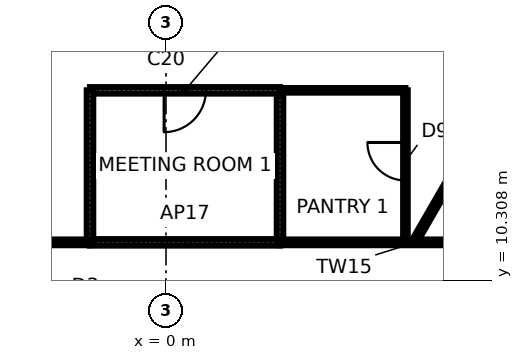
"""IFC4 building model, lengths in metres.
Left out: names, types, materials, properties, quantities, classifications, styles, units other than length and angle.
Written with IfcOpenShell. Run it as: python <this file> out.ifc"""

import sys

from ifc_helpers import new_model, si_unit, direction, frame, frame_2d, origin, place, context, subcontext, project, spatial, rectangle, extrude, element, fill, save


model = new_model("IFC4")
c1 = context("Model", 3, precision=1e-05, world=origin(), true_north=direction((0.0, 1.0)))
c2 = subcontext(c1, "Body", "Model", "MODEL_VIEW")
j1 = project(units=[si_unit("LENGTHUNIT", "METRE"), si_unit("PLANEANGLEUNIT", "RADIAN")], contexts=[c1])
p1 = place(None, origin())
s1 = spatial("IfcSite", under=j1, at=p1, CompositionType="ELEMENT")
p2 = place(p1, origin())
s2 = spatial("IfcBuilding", under=s1, at=p2, CompositionType="ELEMENT")
p3 = place(p2, frame((0.0, 0.0, 44.8)))
s3 = spatial("IfcBuildingStorey", under=s2, at=p3, CompositionType="ELEMENT", Elevation=44.8)
p4 = place(p3, frame((16.0, 11.3, 0.0), z_axis=(0.0, 0.0, 1.0), x_axis=(-1.0, 0.0, 0.0)))
e1 = element("IfcWall", 1, at=p4, inside=s3, PredefinedType="PARTITIONING", context=c2, shape_type="SweptSolid", body=[
    extrude(rectangle(XDim=13.0, YDim=0.15, at=frame_2d((6.5, 0.0))), origin(), (0.0, 0.0, 1.0), 4.04),
])
p5 = place(p4, frame((3.713, 0.0, 0.0)))
e2 = element("IfcOpeningElement", 2, at=p5, cuts=e1, PredefinedType="OPENING", context=c2, shape_type="SweptSolid", body=[
    extrude(rectangle(XDim=2.0, YDim=2.4, at=frame_2d((1.0, 1.2))), frame((0.0, 0.085, 0.0), z_axis=(0.0, -1.0, 0.0), x_axis=(1.0, 0.0, 0.0)), (0.0, 0.0, 1.0), 0.17),
])
p6 = place(p3, frame((6.524, 11.3, 0.0), z_axis=(0.0, 0.0, 1.0), x_axis=(0.499989292232, 0.866031585829, 0.0)))
e3 = element("IfcWall", 3, at=p6, inside=s3, PredefinedType="PARTITIONING", context=c2, shape_type="SweptSolid", body=[
    extrude(rectangle(XDim=10.85, YDim=0.15, at=frame_2d((5.425, 0.0))), origin(), (0.0, 0.0, 1.0), 4.04),
])
p7 = place(p3, frame((6.3, 11.3, 0.0), z_axis=(0.0, 0.0, 1.0), x_axis=(0.0, 1.0, 0.0)))
e4 = element("IfcWall", 4, at=p7, inside=s3, PredefinedType="PARTITIONING", context=c2, shape_type="SweptSolid", body=[
    extrude(rectangle(XDim=4.0, YDim=0.12, at=frame_2d((2.0, 0.0))), origin(), (0.0, 0.0, 1.0), 4.04),
])
p8 = place(p7, frame((1.628, 0.0, 0.0)))
e5 = element("IfcOpeningElement", 5, at=p8, cuts=e4, PredefinedType="OPENING", context=c2, shape_type="SweptSolid", body=[
    extrude(rectangle(XDim=1.0, YDim=2.4, at=frame_2d((0.5, 1.2))), frame((0.0, 0.07, 0.0), z_axis=(0.0, -1.0, 0.0), x_axis=(1.0, 0.0, 0.0)), (0.0, 0.0, 1.0), 0.14),
])
p9 = place(p3, frame((6.3, 15.3, 0.0), z_axis=(0.0, 0.0, 1.0), x_axis=(-1.0, 0.0, 0.0)))
e6 = element("IfcWall", 6, at=p9, inside=s3, PredefinedType="PARTITIONING", context=c2, shape_type="SweptSolid", body=[
    extrude(rectangle(XDim=3.3, YDim=0.12, at=frame_2d((1.65, 0.0))), origin(), (0.0, 0.0, 1.0), 4.04),
])
p10 = place(p3, frame((3.0, 15.3, 0.0), z_axis=(0.0, 0.0, 1.0), x_axis=(0.0, -1.0, 0.0)))
e7 = element("IfcWall", 7, at=p10, inside=s3, PredefinedType="PARTITIONING", context=c2, shape_type="SweptSolid", body=[
    extrude(rectangle(XDim=4.0, YDim=0.17, at=frame_2d((2.0, 0.0))), origin(), (0.0, 0.0, 1.0), 4.04),
])
p11 = place(p3, frame((-2.0, 11.3, 0.0), z_axis=(0.0, 0.0, 1.0), x_axis=(1.0, 0.0, 0.0)))
e8 = element("IfcWall", 8, at=p11, inside=s3, PredefinedType="PARTITIONING", context=c2, shape_type="SweptSolid", body=[
    extrude(rectangle(XDim=5.0, YDim=0.17, at=frame_2d((2.5, 0.0))), origin(), (0.0, 0.0, 1.0), 4.04),
])
p12 = place(p3, frame((3.0, 15.3, 0.0), z_axis=(0.0, 0.0, 1.0), x_axis=(-1.0, 0.0, 0.0)))
e9 = element("IfcWall", 9, at=p12, inside=s3, PredefinedType="PARTITIONING", context=c2, shape_type="SweptSolid", body=[
    extrude(rectangle(XDim=5.0, YDim=0.17, at=frame_2d((2.5, 0.0))), origin(), (0.0, 0.0, 1.0), 3.586),
])
p13 = place(p12, frame((1.95, 0.0, 0.0)))
e10 = element("IfcOpeningElement", 10, at=p13, cuts=e9, PredefinedType="OPENING", context=c2, shape_type="SweptSolid", body=[
    extrude(rectangle(XDim=1.1, YDim=2.4, at=frame_2d((0.55, 1.2))), frame((0.0, 0.095, 0.0), z_axis=(0.0, -1.0, 0.0), x_axis=(1.0, 0.0, 0.0)), (0.0, 0.0, 1.0), 0.19),
])
p14 = place(p3, frame((-2.0, 15.3, 0.0), z_axis=(0.0, 0.0, 1.0), x_axis=(0.0, -1.0, 0.0)))
e11 = element("IfcWall", 11, at=p14, inside=s3, PredefinedType="PARTITIONING", context=c2, shape_type="SweptSolid", body=[
    extrude(rectangle(XDim=4.0, YDim=0.17, at=frame_2d((2.0, 0.0))), origin(), (0.0, 0.0, 1.0), 4.04),
])
p15 = place(p3, frame((-2.0, 11.3, 0.0), z_axis=(0.0, 0.0, 1.0), x_axis=(-1.0, 0.0, 0.0)))
e12 = element("IfcWall", 12, at=p15, inside=s3, PredefinedType="PARTITIONING", context=c2, shape_type="SweptSolid", body=[
    extrude(rectangle(XDim=4.0, YDim=0.15, at=frame_2d((2.0, 0.0))), origin(), (0.0, 0.0, 1.0), 4.04),
])
p16 = place(p13, origin())
e13 = element("IfcDoor", 13, at=p16, inside=s3, OperationType="SINGLE_SWING_RIGHT", PredefinedType="DOOR", context=c2, shape_type="SweptSolid", body=[
    extrude(rectangle(XDim=1.1, YDim=2.4, at=frame_2d((0.55, 1.2))), frame((0.0, 0.025, 0.0), z_axis=(0.0, -1.0, 0.0), x_axis=(1.0, 0.0, 0.0)), (0.0, 0.0, 1.0), 0.05),
])
fill(e10, e13)
p17 = place(p8, origin())
e14 = element("IfcDoor", 14, at=p17, inside=s3, OperationType="SINGLE_SWING_RIGHT", PredefinedType="DOOR", context=c2, shape_type="SweptSolid", body=[
    extrude(rectangle(XDim=1.0, YDim=2.4, at=frame_2d((0.5, 1.2))), frame((0.0, 0.025, 0.0), z_axis=(0.0, -1.0, 0.0), x_axis=(1.0, 0.0, 0.0)), (0.0, 0.0, 1.0), 0.05),
])
fill(e5, e14)
save(model, sys.argv[1])
